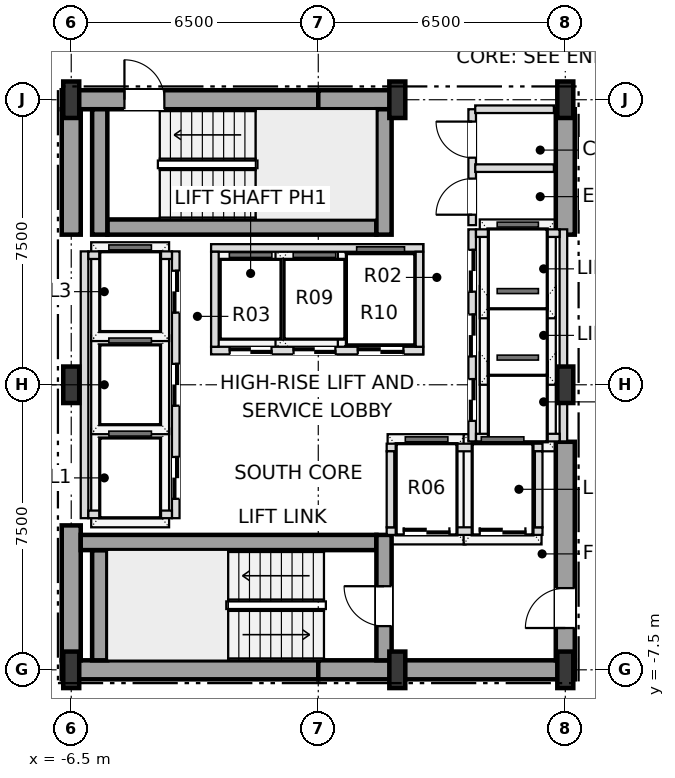
"""IFC4 building model, lengths in metres.
Left out: names, types, materials, properties, quantities, classifications, styles, units other than length and angle.
Written with IfcOpenShell. Run it as: python <this file> out.ifc"""

import sys

from ifc_helpers import new_model, si_unit, direction, frame, frame_2d, origin, origin_2d, place, context, subcontext, project, spatial, rectangle, i_section, extrude, element, fill, save


model = new_model("IFC4")
c1 = context("Model", 3, precision=1e-05, world=origin(), true_north=direction((0.0, 1.0)))
c2 = subcontext(c1, "Body", "Model", "MODEL_VIEW")
j1 = project(units=[si_unit("LENGTHUNIT", "METRE"), si_unit("PLANEANGLEUNIT", "RADIAN")], contexts=[c1])
p1 = place(None, origin())
s1 = spatial("IfcSite", under=j1, at=p1, CompositionType="ELEMENT")
p2 = place(p1, origin())
s2 = spatial("IfcBuilding", under=s1, at=p2, CompositionType="ELEMENT")
p3 = place(p2, frame((0.0, 0.0, -7.2)))
s3 = spatial("IfcBuildingStorey", under=s2, at=p3, CompositionType="ELEMENT", Elevation=-7.2)
for number, where, z_axis, x_axis in (
    (1, (-6.5, -7.5, 0.0), (0.0, 0.0, 1.0), (1.0, 0.0, 0.0)),
    (2, (2.08, -7.5, 0.0), (0.0, 0.0, 1.0), (1.0, 0.0, 0.0)),
    (3, (6.5, -7.5, 0.0), (0.0, 0.0, 1.0), (1.0, 0.0, 0.0)),
    (4, (-6.5, 0.0, 0.0), (0.0, 0.0, 1.0), (1.0, 0.0, 0.0)),
    (5, (6.5, 0.0, 0.0), (0.0, 0.0, 1.0), (1.0, 0.0, 0.0)),
    (6, (-6.5, 7.5, 0.0), (0.0, 0.0, 1.0), (1.0, 0.0, 0.0)),
    (7, (2.08, 7.5, 0.0), (0.0, 0.0, 1.0), (1.0, 0.0, 0.0)),
    (8, (6.5, 7.5, 0.0), (0.0, 0.0, 1.0), (1.0, 0.0, 0.0)),
):
    element("IfcColumn", number, at=place(p3, frame(where, z_axis=z_axis, x_axis=x_axis)), inside=s3, PredefinedType="COLUMN", context=c2, shape_type="SweptSolid", body=[
        extrude(i_section(OverallWidth=0.42, OverallDepth=0.96, WebThickness=0.022, FlangeThickness=0.034, at=origin_2d()), origin(), (0.0, 0.0, 1.0), 3.6),
    ])
for number, where, z_axis, x_axis in (
    (9, (-6.75, -7.5, 0.0), (0.0, 0.0, 1.0), (1.0, 0.0, 0.0)),
    (10, (0.0, -7.5, 0.0), (0.0, 0.0, 1.0), (1.0, 0.0, 0.0)),
):
    element("IfcWall", number, at=place(p3, frame(where, z_axis=z_axis, x_axis=x_axis)), inside=s3, PredefinedType="SHEAR", context=c2, shape_type="SweptSolid", body=[
        extrude(rectangle(XDim=6.75, YDim=0.5, at=frame_2d((3.375, 0.0))), origin(), (0.0, 0.0, 1.0), 3.3),
    ])
p4 = place(p3, frame((-6.75, 7.5, 0.0), z_axis=(0.0, 0.0, 1.0), x_axis=(1.0, 0.0, 0.0)))
e11 = element("IfcWall", 11, at=p4, inside=s3, PredefinedType="SHEAR", context=c2, shape_type="SweptSolid", body=[
    extrude(rectangle(XDim=6.75, YDim=0.5, at=frame_2d((3.375, 0.0))), origin(), (0.0, 0.0, 1.0), 3.3),
])
p5 = place(p4, frame((1.65, 0.0, 0.0)))
e12 = element("IfcOpeningElement", 12, at=p5, cuts=e11, PredefinedType="OPENING", context=c2, shape_type="SweptSolid", body=[
    extrude(rectangle(XDim=1.05, YDim=2.15, at=frame_2d((0.525, 1.075))), frame((0.0, 0.26, 0.0), z_axis=(0.0, -1.0, 0.0), x_axis=(1.0, 0.0, 0.0)), (0.0, 0.0, 1.0), 0.52),
])
p6 = place(p3, frame((0.0, 7.5, 0.0), z_axis=(0.0, 0.0, 1.0), x_axis=(1.0, 0.0, 0.0)))
e13 = element("IfcWall", 13, at=p6, inside=s3, PredefinedType="SHEAR", context=c2, shape_type="SweptSolid", body=[
    extrude(rectangle(XDim=2.08, YDim=0.5, at=frame_2d((1.04, 0.0))), origin(), (0.0, 0.0, 1.0), 3.3),
])
p7 = place(p3, frame((-6.5, -7.25, 0.0), z_axis=(0.0, 0.0, 1.0), x_axis=(0.0, 1.0, 0.0)))
e14 = element("IfcWall", 14, at=p7, inside=s3, PredefinedType="SHEAR", context=c2, shape_type="SweptSolid", body=[
    extrude(rectangle(XDim=3.55, YDim=0.5, at=frame_2d((1.775, 0.0))), origin(), (0.0, 0.0, 1.0), 3.3),
])
p8 = place(p3, frame((-6.5, 3.95, 0.0), z_axis=(0.0, 0.0, 1.0), x_axis=(0.0, 1.0, 0.0)))
e15 = element("IfcWall", 15, at=p8, inside=s3, PredefinedType="SHEAR", context=c2, shape_type="SweptSolid", body=[
    extrude(rectangle(XDim=3.3, YDim=0.5, at=frame_2d((1.65, 0.0))), origin(), (0.0, 0.0, 1.0), 3.3),
])
p9 = place(p3, frame((6.5, -7.25, 0.0), z_axis=(0.0, 0.0, 1.0), x_axis=(0.0, 1.0, 0.0)))
e16 = element("IfcWall", 16, at=p9, inside=s3, PredefinedType="SHEAR", context=c2, shape_type="SweptSolid", body=[
    extrude(rectangle(XDim=5.75, YDim=0.5, at=frame_2d((2.875, 0.0))), origin(), (0.0, 0.0, 1.0), 3.3),
])
p10 = place(p9, frame((0.85, 0.0, 0.0)))
e17 = element("IfcOpeningElement", 17, at=p10, cuts=e16, PredefinedType="OPENING", context=c2, shape_type="SweptSolid", body=[
    extrude(rectangle(XDim=1.05, YDim=2.15, at=frame_2d((0.525, 1.075))), frame((0.0, 0.26, 0.0), z_axis=(0.0, -1.0, 0.0), x_axis=(1.0, 0.0, 0.0)), (0.0, 0.0, 1.0), 0.52),
])
p11 = place(p3, frame((6.5, 3.95, 0.0), z_axis=(0.0, 0.0, 1.0), x_axis=(0.0, 1.0, 0.0)))
e18 = element("IfcWall", 18, at=p11, inside=s3, PredefinedType="SHEAR", context=c2, shape_type="SweptSolid", body=[
    extrude(rectangle(XDim=3.3, YDim=0.5, at=frame_2d((1.65, 0.0))), origin(), (0.0, 0.0, 1.0), 3.3),
])
p12 = place(p3, frame((-5.75, -7.25, 0.0), z_axis=(0.0, 0.0, 1.0), x_axis=(0.0, 1.0, 0.0)))
e19 = element("IfcWall", 19, at=p12, inside=s3, PredefinedType="SHEAR", context=c2, shape_type="SweptSolid", body=[
    extrude(rectangle(XDim=2.9, YDim=0.4, at=frame_2d((1.45, 0.0))), origin(), (0.0, 0.0, 1.0), 3.3),
])
p13 = place(p3, frame((-6.25, -4.15, 0.0), z_axis=(0.0, 0.0, 1.0), x_axis=(1.0, 0.0, 0.0)))
e20 = element("IfcWall", 20, at=p13, inside=s3, PredefinedType="SHEAR", context=c2, shape_type="SweptSolid", body=[
    extrude(rectangle(XDim=7.78, YDim=0.4, at=frame_2d((3.89, 0.0))), origin(), (0.0, 0.0, 1.0), 3.3),
])
p14 = place(p3, frame((1.73, -7.25, 0.0), z_axis=(0.0, 0.0, 1.0), x_axis=(0.0, 1.0, 0.0)))
e21 = element("IfcWall", 21, at=p14, inside=s3, PredefinedType="SHEAR", context=c2, shape_type="SweptSolid", body=[
    extrude(rectangle(XDim=3.3, YDim=0.4, at=frame_2d((1.65, 0.0))), origin(), (0.0, 0.0, 1.0), 3.3),
])
p15 = place(p14, frame((0.9, 0.0, 0.0)))
e22 = element("IfcOpeningElement", 22, at=p15, cuts=e21, PredefinedType="OPENING", context=c2, shape_type="SweptSolid", body=[
    extrude(rectangle(XDim=1.05, YDim=2.15, at=frame_2d((0.525, 1.075))), frame((0.0, 0.21, 0.0), z_axis=(0.0, -1.0, 0.0), x_axis=(1.0, 0.0, 0.0)), (0.0, 0.0, 1.0), 0.42),
])
p16 = place(p3, frame((-5.55, 4.15, 0.0), z_axis=(0.0, 0.0, 1.0), x_axis=(1.0, 0.0, 0.0)))
e23 = element("IfcWall", 23, at=p16, inside=s3, PredefinedType="SHEAR", context=c2, shape_type="SweptSolid", body=[
    extrude(rectangle(XDim=7.08, YDim=0.4, at=frame_2d((3.54, 0.0))), origin(), (0.0, 0.0, 1.0), 3.3),
])
for number, where, z_axis, x_axis in (
    (24, (1.73, 3.95, 0.0), (0.0, 0.0, 1.0), (0.0, 1.0, 0.0)),
    (25, (-5.75, 3.95, 0.0), (0.0, 0.0, 1.0), (0.0, 1.0, 0.0)),
):
    element("IfcWall", number, at=place(p3, frame(where, z_axis=z_axis, x_axis=x_axis)), inside=s3, PredefinedType="SHEAR", context=c2, shape_type="SweptSolid", body=[
        extrude(rectangle(XDim=3.3, YDim=0.4, at=frame_2d((1.65, 0.0))), origin(), (0.0, 0.0, 1.0), 3.3),
    ])
p17 = place(p3, frame((-3.75, -3.51, 0.0), z_axis=(0.0, 0.0, 1.0), x_axis=(0.0, 1.0, 0.0)))
e26 = element("IfcWall", 26, at=p17, inside=s3, PredefinedType="SOLIDWALL", context=c2, shape_type="SweptSolid", body=[
    extrude(rectangle(XDim=7.02, YDim=0.2, at=frame_2d((3.51, 0.0))), origin(), (0.0, 0.0, 1.0), 3.3),
])
p18 = place(p17, frame((0.51, 0.0, 0.0)))
e27 = element("IfcOpeningElement", 27, at=p18, cuts=e26, PredefinedType="OPENING", context=c2, shape_type="SweptSolid", body=[
    extrude(rectangle(XDim=1.1, YDim=2.15, at=frame_2d((0.55, 1.075))), frame((0.0, 0.11, 0.0), z_axis=(0.0, -1.0, 0.0), x_axis=(1.0, 0.0, 0.0)), (0.0, 0.0, 1.0), 0.22),
])
p19 = place(p17, frame((2.96, 0.0, 0.0)))
e28 = element("IfcOpeningElement", 28, at=p19, cuts=e26, PredefinedType="OPENING", context=c2, shape_type="SweptSolid", body=[
    extrude(rectangle(XDim=1.1, YDim=2.15, at=frame_2d((0.55, 1.075))), frame((0.0, 0.11, 0.0), z_axis=(0.0, -1.0, 0.0), x_axis=(1.0, 0.0, 0.0)), (0.0, 0.0, 1.0), 0.22),
])
p20 = place(p17, frame((5.41, 0.0, 0.0)))
e29 = element("IfcOpeningElement", 29, at=p20, cuts=e26, PredefinedType="OPENING", context=c2, shape_type="SweptSolid", body=[
    extrude(rectangle(XDim=1.1, YDim=2.15, at=frame_2d((0.55, 1.075))), frame((0.0, 0.11, 0.0), z_axis=(0.0, -1.0, 0.0), x_axis=(1.0, 0.0, 0.0)), (0.0, 0.0, 1.0), 0.22),
])
p21 = place(p3, frame((-6.15, -3.51, 0.0), z_axis=(0.0, 0.0, 1.0), x_axis=(0.0, 1.0, 0.0)))
e30 = element("IfcWall", 30, at=p21, inside=s3, PredefinedType="SOLIDWALL", context=c2, shape_type="SweptSolid", body=[
    extrude(rectangle(XDim=7.02, YDim=0.2, at=frame_2d((3.51, 0.0))), origin(), (0.0, 0.0, 1.0), 2.385),
])
for number, where, z_axis, x_axis in (
    (31, (-6.05, -3.41, 0.0), (0.0, 0.0, 1.0), (1.0, 0.0, 0.0)),
    (32, (-6.05, 3.41, 0.0), (0.0, 0.0, 1.0), (1.0, 0.0, 0.0)),
):
    element("IfcWall", number, at=place(p3, frame(where, z_axis=z_axis, x_axis=x_axis)), inside=s3, PredefinedType="SOLIDWALL", context=c2, shape_type="SweptSolid", body=[
        extrude(rectangle(XDim=2.2, YDim=0.2, at=frame_2d((1.1, 0.0))), origin(), (0.0, 0.0, 1.0), 3.3),
    ])
p22 = place(p3, frame((4.05, -1.49, 0.0), z_axis=(0.0, 0.0, 1.0), x_axis=(0.0, 1.0, 0.0)))
e33 = element("IfcWall", 33, at=p22, inside=s3, PredefinedType="SOLIDWALL", context=c2, shape_type="SweptSolid", body=[
    extrude(rectangle(XDim=5.58, YDim=0.2, at=frame_2d((2.79, 0.0))), origin(), (0.0, 0.0, 1.0), 3.3),
])
p23 = place(p22, frame((0.54, 0.0, 0.0)))
e34 = element("IfcOpeningElement", 34, at=p23, cuts=e33, PredefinedType="OPENING", context=c2, shape_type="SweptSolid", body=[
    extrude(rectangle(XDim=1.1, YDim=2.15, at=frame_2d((0.55, 1.075))), frame((0.0, 0.11, 0.0), z_axis=(0.0, -1.0, 0.0), x_axis=(1.0, 0.0, 0.0)), (0.0, 0.0, 1.0), 0.22),
])
p24 = place(p22, frame((2.24, 0.0, 0.0)))
e35 = element("IfcOpeningElement", 35, at=p24, cuts=e33, PredefinedType="OPENING", context=c2, shape_type="SweptSolid", body=[
    extrude(rectangle(XDim=1.1, YDim=2.15, at=frame_2d((0.55, 1.075))), frame((0.0, 0.11, 0.0), z_axis=(0.0, -1.0, 0.0), x_axis=(1.0, 0.0, 0.0)), (0.0, 0.0, 1.0), 0.22),
])
p25 = place(p22, frame((3.94, 0.0, 0.0)))
e36 = element("IfcOpeningElement", 36, at=p25, cuts=e33, PredefinedType="OPENING", context=c2, shape_type="SweptSolid", body=[
    extrude(rectangle(XDim=1.1, YDim=2.15, at=frame_2d((0.55, 1.075))), frame((0.0, 0.11, 0.0), z_axis=(0.0, -1.0, 0.0), x_axis=(1.0, 0.0, 0.0)), (0.0, 0.0, 1.0), 0.22),
])
p26 = place(p3, frame((6.45, -1.49, 0.0), z_axis=(0.0, 0.0, 1.0), x_axis=(0.0, 1.0, 0.0)))
e37 = element("IfcWall", 37, at=p26, inside=s3, PredefinedType="SOLIDWALL", context=c2, shape_type="SweptSolid", body=[
    extrude(rectangle(XDim=5.58, YDim=0.2, at=frame_2d((2.79, 0.0))), origin(), (0.0, 0.0, 1.0), 2.385),
])
for number, where, z_axis, x_axis in (
    (38, (4.15, -1.39, 0.0), (0.0, 0.0, 1.0), (1.0, 0.0, 0.0)),
    (39, (4.15, 3.99, 0.0), (0.0, 0.0, 1.0), (1.0, 0.0, 0.0)),
):
    element("IfcWall", number, at=place(p3, frame(where, z_axis=z_axis, x_axis=x_axis)), inside=s3, PredefinedType="SOLIDWALL", context=c2, shape_type="SweptSolid", body=[
        extrude(rectangle(XDim=2.2, YDim=0.2, at=frame_2d((1.1, 0.0))), origin(), (0.0, 0.0, 1.0), 2.385),
    ])
p27 = place(p3, frame((-2.82, 0.9, 0.0), z_axis=(0.0, 0.0, 1.0), x_axis=(1.0, 0.0, 0.0)))
e40 = element("IfcWall", 40, at=p27, inside=s3, PredefinedType="SOLIDWALL", context=c2, shape_type="SweptSolid", body=[
    extrude(rectangle(XDim=5.58, YDim=0.2, at=frame_2d((2.79, 0.0))), origin(), (0.0, 0.0, 1.0), 3.3),
])
p28 = place(p27, frame((0.49, 0.0, 0.0)))
e41 = element("IfcOpeningElement", 41, at=p28, cuts=e40, PredefinedType="OPENING", context=c2, shape_type="SweptSolid", body=[
    extrude(rectangle(XDim=1.1, YDim=2.15, at=frame_2d((0.55, 1.075))), frame((0.0, 0.11, 0.0), z_axis=(0.0, -1.0, 0.0), x_axis=(1.0, 0.0, 0.0)), (0.0, 0.0, 1.0), 0.22),
])
p29 = place(p27, frame((2.17, 0.0, 0.0)))
e42 = element("IfcOpeningElement", 42, at=p29, cuts=e40, PredefinedType="OPENING", context=c2, shape_type="SweptSolid", body=[
    extrude(rectangle(XDim=1.1, YDim=2.15, at=frame_2d((0.55, 1.075))), frame((0.0, 0.11, 0.0), z_axis=(0.0, -1.0, 0.0), x_axis=(1.0, 0.0, 0.0)), (0.0, 0.0, 1.0), 0.22),
])
p30 = place(p27, frame((3.86, 0.0, 0.0)))
e43 = element("IfcOpeningElement", 43, at=p30, cuts=e40, PredefinedType="OPENING", context=c2, shape_type="SweptSolid", body=[
    extrude(rectangle(XDim=1.2, YDim=2.2, at=frame_2d((0.6, 1.1))), frame((0.0, 0.11, 0.0), z_axis=(0.0, -1.0, 0.0), x_axis=(1.0, 0.0, 0.0)), (0.0, 0.0, 1.0), 0.22),
])
p31 = place(p3, frame((-2.82, 3.6, 0.0), z_axis=(0.0, 0.0, 1.0), x_axis=(1.0, 0.0, 0.0)))
e44 = element("IfcWall", 44, at=p31, inside=s3, PredefinedType="SOLIDWALL", context=c2, shape_type="SweptSolid", body=[
    extrude(rectangle(XDim=5.58, YDim=0.2, at=frame_2d((2.79, 0.0))), origin(), (0.0, 0.0, 1.0), 3.3),
])
for number, where, z_axis, x_axis in (
    (45, (-2.72, 1.0, 0.0), (0.0, 0.0, 1.0), (0.0, 1.0, 0.0)),
    (46, (2.66, 1.0, 0.0), (0.0, 0.0, 1.0), (0.0, 1.0, 0.0)),
):
    element("IfcWall", number, at=place(p3, frame(where, z_axis=z_axis, x_axis=x_axis)), inside=s3, PredefinedType="SOLIDWALL", context=c2, shape_type="SweptSolid", body=[
        extrude(rectangle(XDim=2.5, YDim=0.2, at=frame_2d((1.25, 0.0))), origin(), (0.0, 0.0, 1.0), 3.3),
    ])
p32 = place(p3, frame((1.8, -3.85, 0.0), z_axis=(0.0, 0.0, 1.0), x_axis=(1.0, 0.0, 0.0)))
e47 = element("IfcWall", 47, at=p32, inside=s3, PredefinedType="SOLIDWALL", context=c2, shape_type="SweptSolid", body=[
    extrude(rectangle(XDim=4.1, YDim=0.2, at=frame_2d((2.05, 0.0))), origin(), (0.0, 0.0, 1.0), 3.3),
])
p33 = place(p32, frame((0.45, 0.0, 0.0)))
e48 = element("IfcOpeningElement", 48, at=p33, cuts=e47, PredefinedType="OPENING", context=c2, shape_type="SweptSolid", body=[
    extrude(rectangle(XDim=1.2, YDim=2.2, at=frame_2d((0.6, 1.1))), frame((0.0, 0.11, 0.0), z_axis=(0.0, -1.0, 0.0), x_axis=(1.0, 0.0, 0.0)), (0.0, 0.0, 1.0), 0.22),
])
p34 = place(p32, frame((2.45, 0.0, 0.0)))
e49 = element("IfcOpeningElement", 49, at=p34, cuts=e47, PredefinedType="OPENING", context=c2, shape_type="SweptSolid", body=[
    extrude(rectangle(XDim=1.2, YDim=2.2, at=frame_2d((0.6, 1.1))), frame((0.0, 0.11, 0.0), z_axis=(0.0, -1.0, 0.0), x_axis=(1.0, 0.0, 0.0)), (0.0, 0.0, 1.0), 0.22),
])
p35 = place(p3, frame((1.8, -1.65, 0.0), z_axis=(0.0, 0.0, 1.0), x_axis=(1.0, 0.0, 0.0)))
e50 = element("IfcWall", 50, at=p35, inside=s3, PredefinedType="SOLIDWALL", context=c2, shape_type="SweptSolid", body=[
    extrude(rectangle(XDim=4.1, YDim=0.2, at=frame_2d((2.05, 0.0))), origin(), (0.0, 0.0, 1.0), 3.3),
])
for number, where, z_axis, x_axis in (
    (51, (1.9, -3.75, 0.0), (0.0, 0.0, 1.0), (0.0, 1.0, 0.0)),
    (52, (5.8, -3.75, 0.0), (0.0, 0.0, 1.0), (0.0, 1.0, 0.0)),
):
    element("IfcWall", number, at=place(p3, frame(where, z_axis=z_axis, x_axis=x_axis)), inside=s3, PredefinedType="SOLIDWALL", context=c2, shape_type="SweptSolid", body=[
        extrude(rectangle(XDim=2.0, YDim=0.2, at=frame_2d((1.0, 0.0))), origin(), (0.0, 0.0, 1.0), 3.3),
    ])
p36 = place(p3, frame((4.05, 4.2, 0.0), z_axis=(0.0, 0.0, 1.0), x_axis=(0.0, 1.0, 0.0)))
e53 = element("IfcWall", 53, at=p36, inside=s3, PredefinedType="SOLIDWALL", context=c2, shape_type="SweptSolid", body=[
    extrude(rectangle(XDim=3.05, YDim=0.2, at=frame_2d((1.525, 0.0))), origin(), (0.0, 0.0, 1.0), 3.3),
])
p37 = place(p36, frame((0.275, 0.0, 0.0)))
e54 = element("IfcOpeningElement", 54, at=p37, cuts=e53, PredefinedType="OPENING", context=c2, shape_type="SweptSolid", body=[
    extrude(rectangle(XDim=0.95, YDim=2.15, at=frame_2d((0.475, 1.075))), frame((0.0, 0.11, 0.0), z_axis=(0.0, -1.0, 0.0), x_axis=(1.0, 0.0, 0.0)), (0.0, 0.0, 1.0), 0.22),
])
p38 = place(p36, frame((1.775, 0.0, 0.0)))
e55 = element("IfcOpeningElement", 55, at=p38, cuts=e53, PredefinedType="OPENING", context=c2, shape_type="SweptSolid", body=[
    extrude(rectangle(XDim=0.95, YDim=2.15, at=frame_2d((0.475, 1.075))), frame((0.0, 0.11, 0.0), z_axis=(0.0, -1.0, 0.0), x_axis=(1.0, 0.0, 0.0)), (0.0, 0.0, 1.0), 0.22),
])
p39 = place(p3, frame((4.13, 5.7, 0.0), z_axis=(0.0, 0.0, 1.0), x_axis=(1.0, 0.0, 0.0)))
e56 = element("IfcWall", 56, at=p39, inside=s3, PredefinedType="SOLIDWALL", context=c2, shape_type="SweptSolid", body=[
    extrude(rectangle(XDim=2.07, YDim=0.2, at=frame_2d((1.035, 0.0))), origin(), (0.0, 0.0, 1.0), 3.3),
])
p40 = place(p3, frame((4.13, 7.25, 0.0), z_axis=(0.0, 0.0, 1.0), x_axis=(1.0, 0.0, 0.0)))
e57 = element("IfcWall", 57, at=p40, inside=s3, PredefinedType="SOLIDWALL", context=c2, shape_type="SweptSolid", body=[
    extrude(rectangle(XDim=2.07, YDim=0.2, at=frame_2d((1.035, 0.0))), origin(), (0.0, 0.0, 1.0), 2.385),
])
p41 = place(p10, origin())
e58 = element("IfcDoor", 58, at=p41, inside=s3, OperationType="SINGLE_SWING_LEFT", PredefinedType="DOOR", context=c2, shape_type="SweptSolid", body=[
    extrude(rectangle(XDim=1.05, YDim=2.15, at=frame_2d((0.525, 1.075))), frame((0.0, 0.025, 0.0), z_axis=(0.0, -1.0, 0.0), x_axis=(1.0, 0.0, 0.0)), (0.0, 0.0, 1.0), 0.05),
])
fill(e17, e58)
p42 = place(p15, origin())
e59 = element("IfcDoor", 59, at=p42, inside=s3, OperationType="SINGLE_SWING_RIGHT", PredefinedType="DOOR", context=c2, shape_type="SweptSolid", body=[
    extrude(rectangle(XDim=1.05, YDim=2.15, at=frame_2d((0.525, 1.075))), frame((0.0, 0.025, 0.0), z_axis=(0.0, -1.0, 0.0), x_axis=(1.0, 0.0, 0.0)), (0.0, 0.0, 1.0), 0.05),
])
fill(e22, e59)
p43 = place(p5, origin())
e60 = element("IfcDoor", 60, at=p43, inside=s3, OperationType="SINGLE_SWING_LEFT", PredefinedType="DOOR", context=c2, shape_type="SweptSolid", body=[
    extrude(rectangle(XDim=1.05, YDim=2.15, at=frame_2d((0.525, 1.075))), frame((0.0, 0.025, 0.0), z_axis=(0.0, -1.0, 0.0), x_axis=(1.0, 0.0, 0.0)), (0.0, 0.0, 1.0), 0.05),
])
fill(e12, e60)
p44 = place(p18, origin())
e61 = element("IfcDoor", 61, at=p44, inside=s3, OperationType="DOUBLE_DOOR_SLIDING", PredefinedType="DOOR", context=c2, shape_type="SweptSolid", body=[
    extrude(rectangle(XDim=1.1, YDim=2.15, at=frame_2d((0.55, 1.075))), frame((0.0, 0.025, 0.0), z_axis=(0.0, -1.0, 0.0), x_axis=(1.0, 0.0, 0.0)), (0.0, 0.0, 1.0), 0.05),
])
fill(e27, e61)
p45 = place(p19, origin())
e62 = element("IfcDoor", 62, at=p45, inside=s3, OperationType="DOUBLE_DOOR_SLIDING", PredefinedType="DOOR", context=c2, shape_type="SweptSolid", body=[
    extrude(rectangle(XDim=1.1, YDim=2.15, at=frame_2d((0.55, 1.075))), frame((0.0, 0.025, 0.0), z_axis=(0.0, -1.0, 0.0), x_axis=(1.0, 0.0, 0.0)), (0.0, 0.0, 1.0), 0.05),
])
fill(e28, e62)
p46 = place(p20, origin())
e63 = element("IfcDoor", 63, at=p46, inside=s3, OperationType="DOUBLE_DOOR_SLIDING", PredefinedType="DOOR", context=c2, shape_type="SweptSolid", body=[
    extrude(rectangle(XDim=1.1, YDim=2.15, at=frame_2d((0.55, 1.075))), frame((0.0, 0.025, 0.0), z_axis=(0.0, -1.0, 0.0), x_axis=(1.0, 0.0, 0.0)), (0.0, 0.0, 1.0), 0.05),
])
fill(e29, e63)
p47 = place(p23, origin())
e64 = element("IfcDoor", 64, at=p47, inside=s3, OperationType="DOUBLE_DOOR_SLIDING", PredefinedType="DOOR", context=c2, shape_type="SweptSolid", body=[
    extrude(rectangle(XDim=1.1, YDim=2.15, at=frame_2d((0.55, 1.075))), frame((0.0, 0.025, 0.0), z_axis=(0.0, -1.0, 0.0), x_axis=(1.0, 0.0, 0.0)), (0.0, 0.0, 1.0), 0.05),
])
fill(e34, e64)
p48 = place(p24, origin())
e65 = element("IfcDoor", 65, at=p48, inside=s3, OperationType="DOUBLE_DOOR_SLIDING", PredefinedType="DOOR", context=c2, shape_type="SweptSolid", body=[
    extrude(rectangle(XDim=1.1, YDim=2.15, at=frame_2d((0.55, 1.075))), frame((0.0, 0.025, 0.0), z_axis=(0.0, -1.0, 0.0), x_axis=(1.0, 0.0, 0.0)), (0.0, 0.0, 1.0), 0.05),
])
fill(e35, e65)
p49 = place(p25, origin())
e66 = element("IfcDoor", 66, at=p49, inside=s3, OperationType="DOUBLE_DOOR_SLIDING", PredefinedType="DOOR", context=c2, shape_type="SweptSolid", body=[
    extrude(rectangle(XDim=1.1, YDim=2.15, at=frame_2d((0.55, 1.075))), frame((0.0, 0.025, 0.0), z_axis=(0.0, -1.0, 0.0), x_axis=(1.0, 0.0, 0.0)), (0.0, 0.0, 1.0), 0.05),
])
fill(e36, e66)
p50 = place(p28, origin())
e67 = element("IfcDoor", 67, at=p50, inside=s3, OperationType="DOUBLE_DOOR_SLIDING", PredefinedType="DOOR", context=c2, shape_type="SweptSolid", body=[
    extrude(rectangle(XDim=1.1, YDim=2.15, at=frame_2d((0.55, 1.075))), frame((0.0, 0.025, 0.0), z_axis=(0.0, -1.0, 0.0), x_axis=(1.0, 0.0, 0.0)), (0.0, 0.0, 1.0), 0.05),
])
fill(e41, e67)
p51 = place(p29, origin())
e68 = element("IfcDoor", 68, at=p51, inside=s3, OperationType="DOUBLE_DOOR_SLIDING", PredefinedType="DOOR", context=c2, shape_type="SweptSolid", body=[
    extrude(rectangle(XDim=1.1, YDim=2.15, at=frame_2d((0.55, 1.075))), frame((0.0, 0.025, 0.0), z_axis=(0.0, -1.0, 0.0), x_axis=(1.0, 0.0, 0.0)), (0.0, 0.0, 1.0), 0.05),
])
fill(e42, e68)
p52 = place(p30, origin())
e69 = element("IfcDoor", 69, at=p52, inside=s3, OperationType="DOUBLE_DOOR_SLIDING", PredefinedType="DOOR", context=c2, shape_type="SweptSolid", body=[
    extrude(rectangle(XDim=1.2, YDim=2.2, at=frame_2d((0.6, 1.1))), frame((0.0, 0.025, 0.0), z_axis=(0.0, -1.0, 0.0), x_axis=(1.0, 0.0, 0.0)), (0.0, 0.0, 1.0), 0.05),
])
fill(e43, e69)
p53 = place(p33, origin())
e70 = element("IfcDoor", 70, at=p53, inside=s3, OperationType="DOUBLE_DOOR_SLIDING", PredefinedType="DOOR", context=c2, shape_type="SweptSolid", body=[
    extrude(rectangle(XDim=1.2, YDim=2.2, at=frame_2d((0.6, 1.1))), frame((0.0, 0.025, 0.0), z_axis=(0.0, -1.0, 0.0), x_axis=(1.0, 0.0, 0.0)), (0.0, 0.0, 1.0), 0.05),
])
fill(e48, e70)
p54 = place(p34, origin())
e71 = element("IfcDoor", 71, at=p54, inside=s3, OperationType="DOUBLE_DOOR_SLIDING", PredefinedType="DOOR", context=c2, shape_type="SweptSolid", body=[
    extrude(rectangle(XDim=1.2, YDim=2.2, at=frame_2d((0.6, 1.1))), frame((0.0, 0.025, 0.0), z_axis=(0.0, -1.0, 0.0), x_axis=(1.0, 0.0, 0.0)), (0.0, 0.0, 1.0), 0.05),
])
fill(e49, e71)
p55 = place(p37, origin())
e72 = element("IfcDoor", 72, at=p55, inside=s3, OperationType="SINGLE_SWING_LEFT", PredefinedType="DOOR", context=c2, shape_type="SweptSolid", body=[
    extrude(rectangle(XDim=0.95, YDim=2.15, at=frame_2d((0.475, 1.075))), frame((0.0, 0.025, 0.0), z_axis=(0.0, -1.0, 0.0), x_axis=(1.0, 0.0, 0.0)), (0.0, 0.0, 1.0), 0.05),
])
fill(e54, e72)
p56 = place(p38, origin())
e73 = element("IfcDoor", 73, at=p56, inside=s3, OperationType="SINGLE_SWING_RIGHT", PredefinedType="DOOR", context=c2, shape_type="SweptSolid", body=[
    extrude(rectangle(XDim=0.95, YDim=2.15, at=frame_2d((0.475, 1.075))), frame((0.0, 0.025, 0.0), z_axis=(0.0, -1.0, 0.0), x_axis=(1.0, 0.0, 0.0)), (0.0, 0.0, 1.0), 0.05),
])
fill(e55, e73)
save(model, sys.argv[1])
